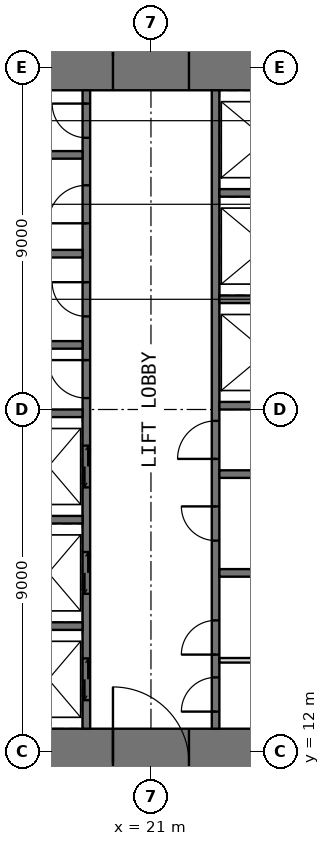
"""IFC4 building model, lengths in metres.
Left out: names, types, materials, properties, quantities, classifications, styles, units other than length and angle.
Written with IfcOpenShell. Run it as: python <this file> out.ifc"""

import sys

from ifc_helpers import new_model, si_unit, direction, frame, frame_2d, origin, place, context, subcontext, project, spatial, rectangle, extrude, element, fill, save


model = new_model("IFC4")
c1 = context("Model", 3, precision=1e-05, world=origin(), true_north=direction((0.0, 1.0)))
c2 = subcontext(c1, "Body", "Model", "MODEL_VIEW")
j1 = project(units=[si_unit("LENGTHUNIT", "METRE"), si_unit("PLANEANGLEUNIT", "RADIAN")], contexts=[c1])
p1 = place(None, origin())
s1 = spatial("IfcSite", under=j1, at=p1, CompositionType="ELEMENT")
p2 = place(p1, origin())
s2 = spatial("IfcBuilding", under=s1, at=p2, CompositionType="ELEMENT")
p3 = place(p2, frame((0.0, 0.0, 62.5)))
s3 = spatial("IfcBuildingStorey", under=s2, at=p3, CompositionType="ELEMENT", Elevation=62.5)
p4 = place(p3, frame((10.8, 11.7, -0.05), z_axis=(0.0, 0.0, 1.0), x_axis=(1.0, 0.0, 0.0)))
e1 = element("IfcWall", 1, at=p4, inside=s3, PredefinedType="SHEAR", context=c2, shape_type="SweptSolid", body=[
    extrude(rectangle(XDim=20.4, YDim=1.8, at=frame_2d((10.2, 0.0))), origin(), (0.0, 0.0, 1.0), 4.0),
])
p5 = place(p4, frame((9.2, 0.0, 0.05)))
e2 = element("IfcOpeningElement", 2, at=p5, cuts=e1, PredefinedType="OPENING", context=c2, shape_type="SweptSolid", body=[
    extrude(rectangle(XDim=2.0, YDim=2.2, at=frame_2d((1.0, 1.1))), frame((0.0, 0.91, 0.0), z_axis=(0.0, -1.0, 0.0), x_axis=(1.0, 0.0, 0.0)), (0.0, 0.0, 1.0), 1.82),
])
p6 = place(p3, frame((10.8, 30.3, -0.05), z_axis=(0.0, 0.0, 1.0), x_axis=(1.0, 0.0, 0.0)))
e3 = element("IfcWall", 3, at=p6, inside=s3, PredefinedType="SHEAR", context=c2, shape_type="SweptSolid", body=[
    extrude(rectangle(XDim=20.4, YDim=1.8, at=frame_2d((10.2, 0.0))), origin(), (0.0, 0.0, 1.0), 4.0),
])
p7 = place(p6, frame((9.2, 0.0, 0.05)))
e4 = element("IfcOpeningElement", 4, at=p7, cuts=e3, PredefinedType="OPENING", context=c2, shape_type="SweptSolid", body=[
    extrude(rectangle(XDim=2.0, YDim=2.2, at=frame_2d((1.0, 1.1))), frame((0.0, 0.91, 0.0), z_axis=(0.0, -1.0, 0.0), x_axis=(1.0, 0.0, 0.0)), (0.0, 0.0, 1.0), 1.82),
])
p8 = place(p3, frame((19.3, 12.6, -0.05), z_axis=(0.0, 0.0, 1.0), x_axis=(0.0, 1.0, 0.0)))
e5 = element("IfcWall", 5, at=p8, inside=s3, PredefinedType="SHEAR", context=c2, shape_type="SweptSolid", body=[
    extrude(rectangle(XDim=16.8, YDim=0.2, at=frame_2d((8.4, 0.0))), origin(), (0.0, 0.0, 1.0), 4.0),
])
p9 = place(p8, frame((8.7, 0.0, 0.05)))
e6 = element("IfcOpeningElement", 6, at=p9, cuts=e5, PredefinedType="OPENING", context=c2, shape_type="SweptSolid", body=[
    extrude(rectangle(XDim=1.0, YDim=2.2, at=frame_2d((0.5, 1.1))), frame((0.0, 0.11, 0.0), z_axis=(0.0, -1.0, 0.0), x_axis=(1.0, 0.0, 0.0)), (0.0, 0.0, 1.0), 0.22),
])
p10 = place(p8, frame((10.85, 0.0, 0.05)))
e7 = element("IfcOpeningElement", 7, at=p10, cuts=e5, PredefinedType="OPENING", context=c2, shape_type="SweptSolid", body=[
    extrude(rectangle(XDim=0.9, YDim=2.2, at=frame_2d((0.45, 1.1))), frame((0.0, 0.11, 0.0), z_axis=(0.0, -1.0, 0.0), x_axis=(1.0, 0.0, 0.0)), (0.0, 0.0, 1.0), 0.22),
])
p11 = place(p8, frame((13.3, 0.0, 0.05)))
e8 = element("IfcOpeningElement", 8, at=p11, cuts=e5, PredefinedType="OPENING", context=c2, shape_type="SweptSolid", body=[
    extrude(rectangle(XDim=1.0, YDim=2.2, at=frame_2d((0.5, 1.1))), frame((0.0, 0.11, 0.0), z_axis=(0.0, -1.0, 0.0), x_axis=(1.0, 0.0, 0.0)), (0.0, 0.0, 1.0), 0.22),
])
p12 = place(p8, frame((15.55, 0.0, 0.05)))
e9 = element("IfcOpeningElement", 9, at=p12, cuts=e5, PredefinedType="OPENING", context=c2, shape_type="SweptSolid", body=[
    extrude(rectangle(XDim=0.9, YDim=2.2, at=frame_2d((0.45, 1.1))), frame((0.0, 0.11, 0.0), z_axis=(0.0, -1.0, 0.0), x_axis=(1.0, 0.0, 0.0)), (0.0, 0.0, 1.0), 0.22),
])
p13 = place(p8, frame((0.75, 0.0, 0.05)))
e10 = element("IfcOpeningElement", 10, at=p13, cuts=e5, PredefinedType="OPENING", context=c2, shape_type="SweptSolid", body=[
    extrude(rectangle(XDim=1.1, YDim=2.2, at=frame_2d((0.55, 1.1))), frame((0.0, 0.11, 0.0), z_axis=(0.0, -1.0, 0.0), x_axis=(1.0, 0.0, 0.0)), (0.0, 0.0, 1.0), 0.22),
])
p14 = place(p8, frame((3.55, 0.0, 0.05)))
e11 = element("IfcOpeningElement", 11, at=p14, cuts=e5, PredefinedType="OPENING", context=c2, shape_type="SweptSolid", body=[
    extrude(rectangle(XDim=1.1, YDim=2.2, at=frame_2d((0.55, 1.1))), frame((0.0, 0.11, 0.0), z_axis=(0.0, -1.0, 0.0), x_axis=(1.0, 0.0, 0.0)), (0.0, 0.0, 1.0), 0.22),
])
p15 = place(p8, frame((6.35, 0.0, 0.05)))
e12 = element("IfcOpeningElement", 12, at=p15, cuts=e5, PredefinedType="OPENING", context=c2, shape_type="SweptSolid", body=[
    extrude(rectangle(XDim=1.1, YDim=2.2, at=frame_2d((0.55, 1.1))), frame((0.0, 0.11, 0.0), z_axis=(0.0, -1.0, 0.0), x_axis=(1.0, 0.0, 0.0)), (0.0, 0.0, 1.0), 0.22),
])
p16 = place(p3, frame((22.7, 12.6, -0.05), z_axis=(0.0, 0.0, 1.0), x_axis=(0.0, 1.0, 0.0)))
e13 = element("IfcWall", 13, at=p16, inside=s3, PredefinedType="SHEAR", context=c2, shape_type="SweptSolid", body=[
    extrude(rectangle(XDim=16.8, YDim=0.2, at=frame_2d((8.4, 0.0))), origin(), (0.0, 0.0, 1.0), 4.0),
])
p17 = place(p16, frame((0.45, 0.0, 0.05)))
e14 = element("IfcOpeningElement", 14, at=p17, cuts=e13, PredefinedType="OPENING", context=c2, shape_type="SweptSolid", body=[
    extrude(rectangle(XDim=0.9, YDim=2.2, at=frame_2d((0.45, 1.1))), frame((0.0, 0.11, 0.0), z_axis=(0.0, -1.0, 0.0), x_axis=(1.0, 0.0, 0.0)), (0.0, 0.0, 1.0), 0.22),
])
p18 = place(p16, frame((7.1, 0.0, 0.05)))
e15 = element("IfcOpeningElement", 15, at=p18, cuts=e13, PredefinedType="OPENING", context=c2, shape_type="SweptSolid", body=[
    extrude(rectangle(XDim=1.0, YDim=2.2, at=frame_2d((0.5, 1.1))), frame((0.0, 0.11, 0.0), z_axis=(0.0, -1.0, 0.0), x_axis=(1.0, 0.0, 0.0)), (0.0, 0.0, 1.0), 0.22),
])
p19 = place(p16, frame((1.95, 0.0, 0.05)))
e16 = element("IfcOpeningElement", 16, at=p19, cuts=e13, PredefinedType="OPENING", context=c2, shape_type="SweptSolid", body=[
    extrude(rectangle(XDim=0.9, YDim=2.2, at=frame_2d((0.45, 1.1))), frame((0.0, 0.11, 0.0), z_axis=(0.0, -1.0, 0.0), x_axis=(1.0, 0.0, 0.0)), (0.0, 0.0, 1.0), 0.22),
])
p20 = place(p16, frame((4.95, 0.0, 0.05)))
e17 = element("IfcOpeningElement", 17, at=p20, cuts=e13, PredefinedType="OPENING", context=c2, shape_type="SweptSolid", body=[
    extrude(rectangle(XDim=0.9, YDim=2.2, at=frame_2d((0.45, 1.1))), frame((0.0, 0.11, 0.0), z_axis=(0.0, -1.0, 0.0), x_axis=(1.0, 0.0, 0.0)), (0.0, 0.0, 1.0), 0.22),
])
for number, where, z_axis, x_axis in (
    (18, (16.0, 15.3, -0.05), (0.0, 0.0, 1.0), (1.0, 0.0, 0.0)),
    (19, (16.0, 18.1, -0.05), (0.0, 0.0, 1.0), (1.0, 0.0, 0.0)),
    (20, (16.0, 20.9, -0.05), (0.0, 0.0, 1.0), (1.0, 0.0, 0.0)),
    (21, (16.0, 22.7, -0.05), (0.0, 0.0, 1.0), (1.0, 0.0, 0.0)),
    (22, (16.0, 25.1, -0.05), (0.0, 0.0, 1.0), (1.0, 0.0, 0.0)),
    (23, (16.0, 27.7, -0.05), (0.0, 0.0, 1.0), (1.0, 0.0, 0.0)),
    (24, (22.8, 16.7, -0.05), (0.0, 0.0, 1.0), (1.0, 0.0, 0.0)),
    (25, (22.8, 19.3, -0.05), (0.0, 0.0, 1.0), (1.0, 0.0, 0.0)),
    (26, (22.8, 21.1, -0.05), (0.0, 0.0, 1.0), (1.0, 0.0, 0.0)),
    (27, (22.8, 23.9, -0.05), (0.0, 0.0, 1.0), (1.0, 0.0, 0.0)),
    (28, (22.8, 26.7, -0.05), (0.0, 0.0, 1.0), (1.0, 0.0, 0.0)),
):
    element("IfcWall", number, at=place(p3, frame(where, z_axis=z_axis, x_axis=x_axis)), inside=s3, PredefinedType="SHEAR", context=c2, shape_type="SweptSolid", body=[
        extrude(rectangle(XDim=3.2, YDim=0.2, at=frame_2d((1.6, 0.0))), origin(), (0.0, 0.0, 1.0), 4.0),
    ])
p21 = place(p3, frame((22.8, 14.4, 0.0), z_axis=(0.0, 0.0, 1.0), x_axis=(1.0, 0.0, 0.0)))
e29 = element("IfcWall", 29, at=p21, inside=s3, PredefinedType="PARTITIONING", context=c2, shape_type="SweptSolid", body=[
    extrude(rectangle(XDim=3.2, YDim=0.12, at=frame_2d((1.6, 0.0))), origin(), (0.0, 0.0, 1.0), 3.75),
])
p22 = place(p5, origin())
e30 = element("IfcDoor", 30, at=p22, inside=s3, OperationType="DOUBLE_DOOR_SINGLE_SWING", PredefinedType="DOOR", context=c2, shape_type="SweptSolid", body=[
    extrude(rectangle(XDim=2.0, YDim=2.2, at=frame_2d((1.0, 1.1))), frame((0.0, 0.025, 0.0), z_axis=(0.0, -1.0, 0.0), x_axis=(1.0, 0.0, 0.0)), (0.0, 0.0, 1.0), 0.05),
])
fill(e2, e30)
p23 = place(p7, origin())
e31 = element("IfcDoor", 31, at=p23, inside=s3, OperationType="DOUBLE_DOOR_SINGLE_SWING", PredefinedType="DOOR", context=c2, shape_type="SweptSolid", body=[
    extrude(rectangle(XDim=2.0, YDim=2.2, at=frame_2d((1.0, 1.1))), frame((0.0, 0.025, 0.0), z_axis=(0.0, -1.0, 0.0), x_axis=(1.0, 0.0, 0.0)), (0.0, 0.0, 1.0), 0.05),
])
fill(e4, e31)
p24 = place(p17, origin())
e32 = element("IfcDoor", 32, at=p24, inside=s3, OperationType="SINGLE_SWING_LEFT", PredefinedType="DOOR", context=c2, shape_type="SweptSolid", body=[
    extrude(rectangle(XDim=0.9, YDim=2.2, at=frame_2d((0.45, 1.1))), frame((0.0, 0.025, 0.0), z_axis=(0.0, -1.0, 0.0), x_axis=(1.0, 0.0, 0.0)), (0.0, 0.0, 1.0), 0.05),
])
fill(e14, e32)
p25 = place(p9, origin())
e33 = element("IfcDoor", 33, at=p25, inside=s3, OperationType="SINGLE_SWING_RIGHT", PredefinedType="DOOR", context=c2, shape_type="SweptSolid", body=[
    extrude(rectangle(XDim=1.0, YDim=2.2, at=frame_2d((0.5, 1.1))), frame((0.0, 0.025, 0.0), z_axis=(0.0, -1.0, 0.0), x_axis=(1.0, 0.0, 0.0)), (0.0, 0.0, 1.0), 0.05),
])
fill(e6, e33)
p26 = place(p18, origin())
e34 = element("IfcDoor", 34, at=p26, inside=s3, OperationType="SINGLE_SWING_LEFT", PredefinedType="DOOR", context=c2, shape_type="SweptSolid", body=[
    extrude(rectangle(XDim=1.0, YDim=2.2, at=frame_2d((0.5, 1.1))), frame((0.0, 0.025, 0.0), z_axis=(0.0, -1.0, 0.0), x_axis=(1.0, 0.0, 0.0)), (0.0, 0.0, 1.0), 0.05),
])
fill(e15, e34)
p27 = place(p10, origin())
e35 = element("IfcDoor", 35, at=p27, inside=s3, OperationType="SINGLE_SWING_RIGHT", PredefinedType="DOOR", context=c2, shape_type="SweptSolid", body=[
    extrude(rectangle(XDim=0.9, YDim=2.2, at=frame_2d((0.45, 1.1))), frame((0.0, 0.025, 0.0), z_axis=(0.0, -1.0, 0.0), x_axis=(1.0, 0.0, 0.0)), (0.0, 0.0, 1.0), 0.05),
])
fill(e7, e35)
p28 = place(p11, origin())
e36 = element("IfcDoor", 36, at=p28, inside=s3, OperationType="SINGLE_SWING_LEFT", PredefinedType="DOOR", context=c2, shape_type="SweptSolid", body=[
    extrude(rectangle(XDim=1.0, YDim=2.2, at=frame_2d((0.5, 1.1))), frame((0.0, 0.025, 0.0), z_axis=(0.0, -1.0, 0.0), x_axis=(1.0, 0.0, 0.0)), (0.0, 0.0, 1.0), 0.05),
])
fill(e8, e36)
p29 = place(p12, origin())
e37 = element("IfcDoor", 37, at=p29, inside=s3, OperationType="SINGLE_SWING_RIGHT", PredefinedType="DOOR", context=c2, shape_type="SweptSolid", body=[
    extrude(rectangle(XDim=0.9, YDim=2.2, at=frame_2d((0.45, 1.1))), frame((0.0, 0.025, 0.0), z_axis=(0.0, -1.0, 0.0), x_axis=(1.0, 0.0, 0.0)), (0.0, 0.0, 1.0), 0.05),
])
fill(e9, e37)
p30 = place(p19, origin())
e38 = element("IfcDoor", 38, at=p30, inside=s3, OperationType="SINGLE_SWING_LEFT", PredefinedType="DOOR", context=c2, shape_type="SweptSolid", body=[
    extrude(rectangle(XDim=0.9, YDim=2.2, at=frame_2d((0.45, 1.1))), frame((0.0, 0.025, 0.0), z_axis=(0.0, -1.0, 0.0), x_axis=(1.0, 0.0, 0.0)), (0.0, 0.0, 1.0), 0.05),
])
fill(e16, e38)
p31 = place(p20, origin())
e39 = element("IfcDoor", 39, at=p31, inside=s3, OperationType="SINGLE_SWING_RIGHT", PredefinedType="DOOR", context=c2, shape_type="SweptSolid", body=[
    extrude(rectangle(XDim=0.9, YDim=2.2, at=frame_2d((0.45, 1.1))), frame((0.0, 0.025, 0.0), z_axis=(0.0, -1.0, 0.0), x_axis=(1.0, 0.0, 0.0)), (0.0, 0.0, 1.0), 0.05),
])
fill(e17, e39)
p32 = place(p13, origin())
e40 = element("IfcDoor", 40, at=p32, inside=s3, OperationType="DOUBLE_DOOR_SLIDING", PredefinedType="DOOR", context=c2, shape_type="SweptSolid", body=[
    extrude(rectangle(XDim=1.1, YDim=2.2, at=frame_2d((0.55, 1.1))), frame((0.0, 0.025, 0.0), z_axis=(0.0, -1.0, 0.0), x_axis=(1.0, 0.0, 0.0)), (0.0, 0.0, 1.0), 0.05),
])
fill(e10, e40)
p33 = place(p14, origin())
e41 = element("IfcDoor", 41, at=p33, inside=s3, OperationType="DOUBLE_DOOR_SLIDING", PredefinedType="DOOR", context=c2, shape_type="SweptSolid", body=[
    extrude(rectangle(XDim=1.1, YDim=2.2, at=frame_2d((0.55, 1.1))), frame((0.0, 0.025, 0.0), z_axis=(0.0, -1.0, 0.0), x_axis=(1.0, 0.0, 0.0)), (0.0, 0.0, 1.0), 0.05),
])
fill(e11, e41)
p34 = place(p15, origin())
e42 = element("IfcDoor", 42, at=p34, inside=s3, OperationType="DOUBLE_DOOR_SLIDING", PredefinedType="DOOR", context=c2, shape_type="SweptSolid", body=[
    extrude(rectangle(XDim=1.1, YDim=2.2, at=frame_2d((0.55, 1.1))), frame((0.0, 0.025, 0.0), z_axis=(0.0, -1.0, 0.0), x_axis=(1.0, 0.0, 0.0)), (0.0, 0.0, 1.0), 0.05),
])
fill(e12, e42)
save(model, sys.argv[1])
